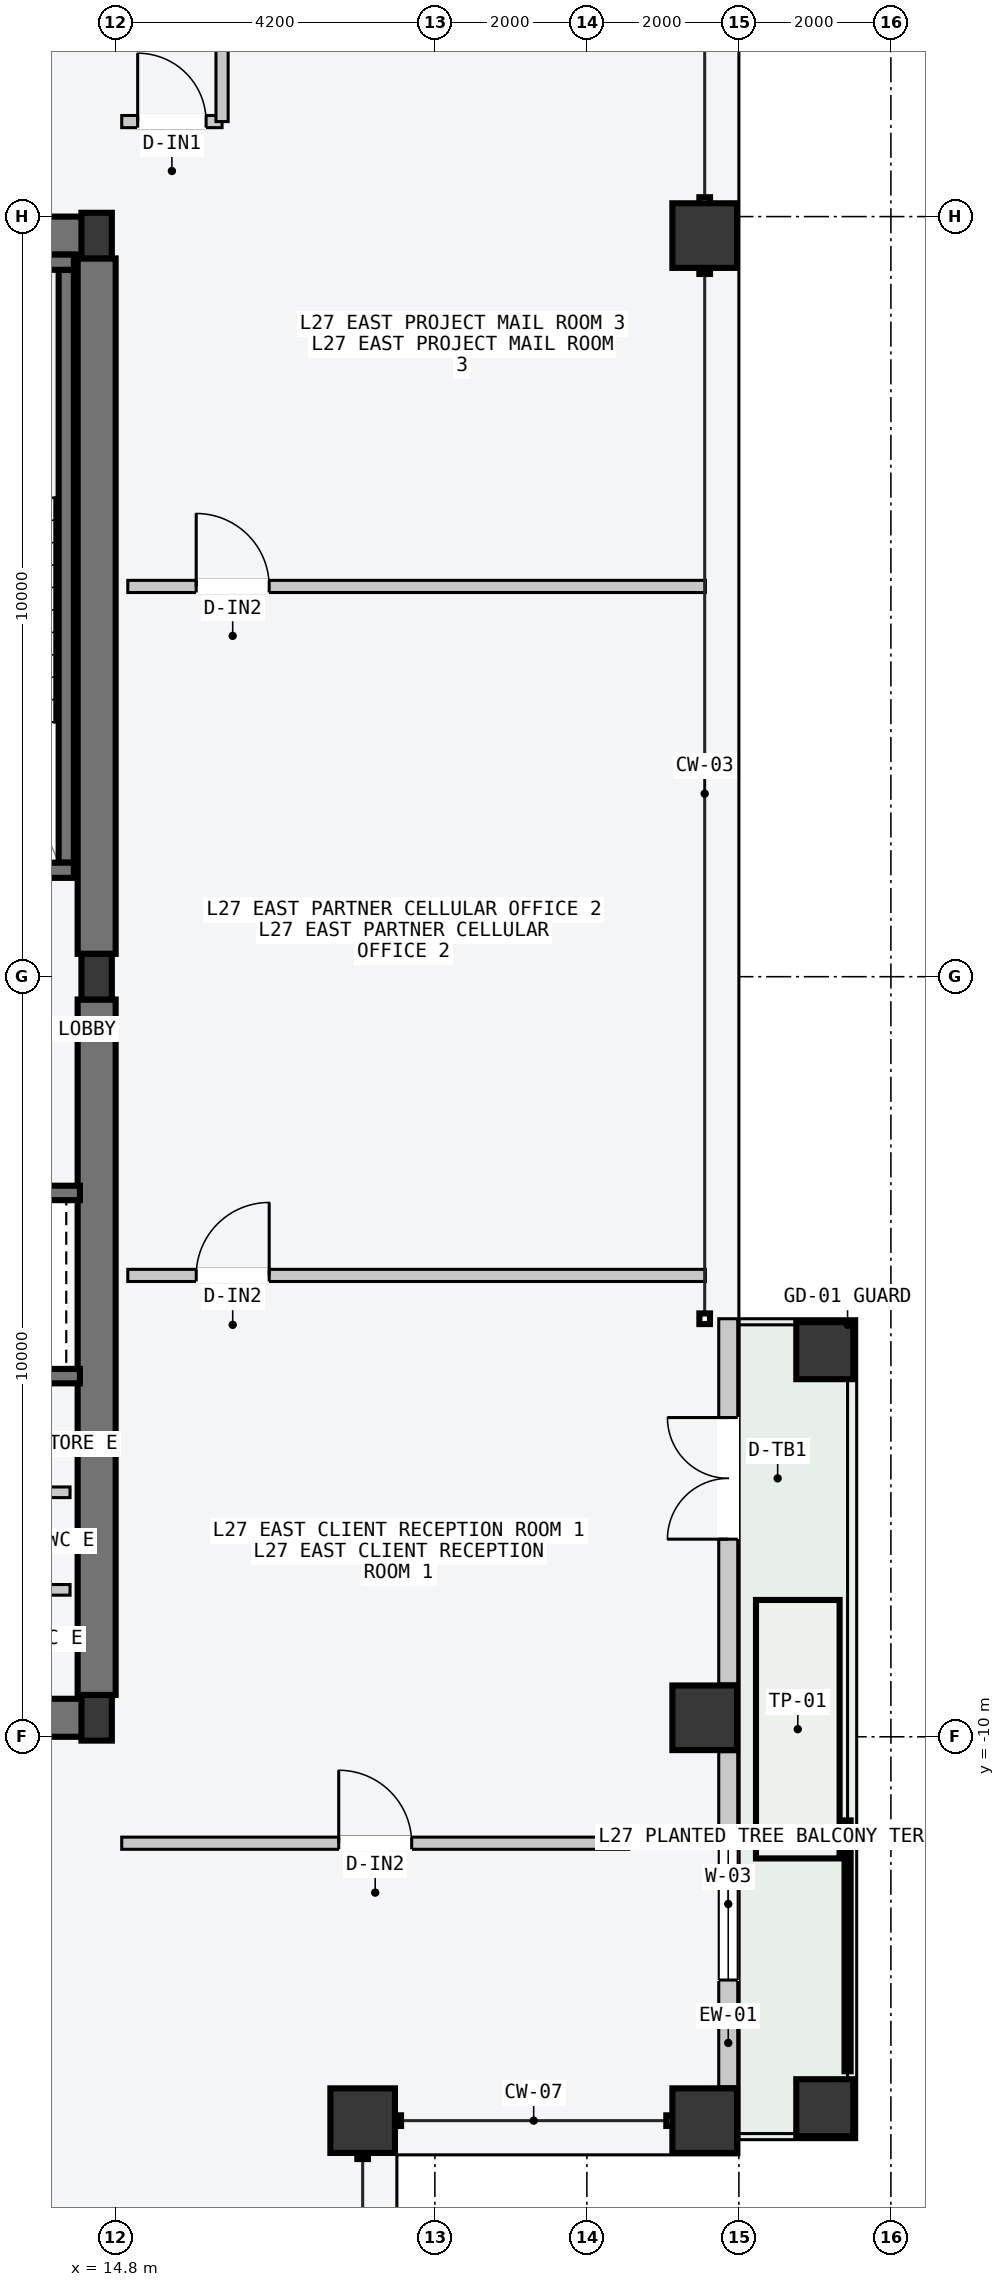
"""IFC4 building model, lengths in metres.
Left out: names, types, materials, properties, quantities, classifications, styles, units other than length and angle.
Written with IfcOpenShell. Run it as: python <this file> out.ifc"""

import sys

from ifc_helpers import new_model, si_unit, direction, frame, frame_2d, origin, origin_2d, place, context, subcontext, project, spatial, rectangle, hollow_rectangle, i_section, extrude, element, fill, save


model = new_model("IFC4")
c1 = context("Model", 3, precision=1e-05, world=origin(), true_north=direction((0.0, 1.0)))
c2 = subcontext(c1, "Body", "Model", "MODEL_VIEW")
j1 = project(units=[si_unit("LENGTHUNIT", "METRE"), si_unit("PLANEANGLEUNIT", "RADIAN")], contexts=[c1])
p1 = place(None, origin())
s1 = spatial("IfcSite", under=j1, at=p1, CompositionType="ELEMENT")
p2 = place(p1, origin())
s2 = spatial("IfcBuilding", under=s1, at=p2, CompositionType="ELEMENT")
p3 = place(p2, frame((0.0, 0.0, 106.2)))
s3 = spatial("IfcBuildingStorey", under=s2, at=p3, CompositionType="ELEMENT", Elevation=106.2)
for number, where, z_axis, x_axis in (
    (1, (8.07, -9.75, -0.2), (0.0, 0.0, 1.0), (1.0, 0.0, 0.0)),
    (2, (8.07, 9.75, -0.2), (0.0, 0.0, 1.0), (1.0, 0.0, 0.0)),
):
    element("IfcWall", number, at=place(p3, frame(where, z_axis=z_axis, x_axis=x_axis)), inside=s3, PredefinedType="SHEAR", context=c2, shape_type="SweptSolid", body=[
        extrude(rectangle(XDim=6.46, YDim=0.5, at=frame_2d((3.23, 0.0))), origin(), (0.0, 0.0, 1.0), 3.6),
    ])
for number, where, z_axis, x_axis in (
    (3, (14.55, -9.45, -0.2), (0.0, 0.0, 1.0), (0.0, 1.0, 0.0)),
    (4, (14.55, 0.3, -0.2), (0.0, 0.0, 1.0), (0.0, 1.0, 0.0)),
):
    element("IfcWall", number, at=place(p3, frame(where, z_axis=z_axis, x_axis=x_axis)), inside=s3, PredefinedType="SHEAR", context=c2, shape_type="SweptSolid", body=[
        extrude(rectangle(XDim=9.15, YDim=0.5, at=frame_2d((4.575, 0.0))), origin(), (0.0, 0.0, 1.0), 3.6),
    ])
p4 = place(p3, frame((14.15, 1.5, -0.2), z_axis=(0.0, 0.0, 1.0), x_axis=(0.0, 1.0, 0.0)))
e5 = element("IfcWall", 5, at=p4, inside=s3, PredefinedType="SOLIDWALL", context=c2, shape_type="SweptSolid", body=[
    extrude(rectangle(XDim=7.8, YDim=0.2, at=frame_2d((3.9, 0.0))), origin(), (0.0, 0.0, 1.0), 3.6),
])
p5 = place(p3, frame((10.15, 1.4, -0.2), z_axis=(0.0, 0.0, 1.0), x_axis=(1.0, 0.0, 0.0)))
e6 = element("IfcWall", 6, at=p5, inside=s3, PredefinedType="SOLIDWALL", context=c2, shape_type="SweptSolid", body=[
    extrude(rectangle(XDim=4.1, YDim=0.2, at=frame_2d((2.05, 0.0))), origin(), (0.0, 0.0, 1.0), 3.6),
])
p6 = place(p5, frame((1.5, 0.0, 0.2)))
e7 = element("IfcOpeningElement", 7, at=p6, cuts=e6, PredefinedType="OPENING", context=c2, shape_type="SweptSolid", body=[
    extrude(rectangle(XDim=1.12, YDim=2.18, at=frame_2d((0.56, 1.09))), frame((0.0, 0.11, 0.0), z_axis=(0.0, -1.0, 0.0), x_axis=(1.0, 0.0, 0.0)), (0.0, 0.0, 1.0), 0.22),
])
p7 = place(p3, frame((10.15, 9.4, -0.2), z_axis=(0.0, 0.0, 1.0), x_axis=(1.0, 0.0, 0.0)))
e8 = element("IfcWall", 8, at=p7, inside=s3, PredefinedType="SOLIDWALL", context=c2, shape_type="SweptSolid", body=[
    extrude(rectangle(XDim=4.1, YDim=0.2, at=frame_2d((2.05, 0.0))), origin(), (0.0, 0.0, 1.0), 3.6),
])
for number, where, z_axis, x_axis in (
    (9, (14.55, -9.75, 0.0), (0.0, 0.0, 1.0), (1.0, 0.0, 0.0)),
    (10, (14.55, 0.0, 0.0), (0.0, 0.0, 1.0), (1.0, 0.0, 0.0)),
    (11, (14.55, 9.75, 0.0), (0.0, 0.0, 1.0), (1.0, 0.0, 0.0)),
):
    element("IfcColumn", number, at=place(p3, frame(where, z_axis=z_axis, x_axis=x_axis)), inside=s3, PredefinedType="COLUMN", context=c2, shape_type="SweptSolid", body=[
        extrude(i_section(OverallWidth=0.4, OverallDepth=0.6, WebThickness=0.022, FlangeThickness=0.036, at=origin_2d()), origin(), (0.0, 0.0, 1.0), 3.6),
    ])
for number, where, z_axis, x_axis in (
    (12, (22.55, -15.05, 0.0), (0.0, 0.0, 1.0), (0.0, 1.0, 0.0)),
    (13, (22.55, -9.75, 0.0), (0.0, 0.0, 1.0), (0.0, 1.0, 0.0)),
    (14, (22.55, 9.75, 0.0), (0.0, 0.0, 1.0), (0.0, 1.0, 0.0)),
    (15, (18.05, -15.05, 0.0), (0.0, 0.0, 1.0), (1.0, 0.0, 0.0)),
):
    element("IfcColumn", number, at=place(p3, frame(where, z_axis=z_axis, x_axis=x_axis)), inside=s3, PredefinedType="COLUMN", context=c2, shape_type="SweptSolid", body=[
        extrude(hollow_rectangle(XDim=0.85, YDim=0.85, WallThickness=0.04, at=origin_2d()), origin(), (0.0, 0.0, 1.0), 3.6),
    ])
for number, where, z_axis, x_axis in (
    (16, (24.13, -14.88, 0.0), (0.0, 0.0, 1.0), (0.0, 1.0, 0.0)),
    (17, (24.13, -4.92, 0.0), (0.0, 0.0, 1.0), (0.0, 1.0, 0.0)),
):
    element("IfcColumn", number, at=place(p3, frame(where, z_axis=z_axis, x_axis=x_axis)), inside=s3, PredefinedType="COLUMN", context=c2, shape_type="SweptSolid", body=[
        extrude(hollow_rectangle(XDim=0.75, YDim=0.75, WallThickness=0.032, at=origin_2d()), origin(), (0.0, 0.0, 1.0), 3.6),
    ])
p8 = place(p3, frame((22.86, -14.605, 0.0), z_axis=(0.0, 0.0, 1.0), x_axis=(0.0, 1.0, 0.0)))
e18 = element("IfcWall", 18, at=p8, inside=s3, PredefinedType="STANDARD", context=c2, shape_type="SweptSolid", body=[
    extrude(rectangle(XDim=4.41, YDim=0.25, at=frame_2d((2.205, 0.0))), origin(), (0.0, 0.0, 1.0), 3.4),
])
p9 = place(p8, frame((1.405, 0.0, 0.85)))
e19 = element("IfcOpeningElement", 19, at=p9, cuts=e18, PredefinedType="OPENING", context=c2, shape_type="SweptSolid", body=[
    extrude(rectangle(XDim=2.0, YDim=2.1, at=frame_2d((1.0, 1.05))), frame((0.0, 0.135, 0.0), z_axis=(0.0, -1.0, 0.0), x_axis=(1.0, 0.0, 0.0)), (0.0, 0.0, 1.0), 0.27),
])
p10 = place(p3, frame((22.86, -9.305, 0.0), z_axis=(0.0, 0.0, 1.0), x_axis=(0.0, 1.0, 0.0)))
e20 = element("IfcWall", 20, at=p10, inside=s3, PredefinedType="STANDARD", context=c2, shape_type="SweptSolid", body=[
    extrude(rectangle(XDim=4.805, YDim=0.25, at=frame_2d((2.402, 0.0))), origin(), (0.0, 0.0, 1.0), 3.4),
])
p11 = place(p10, frame((1.905, 0.0, 0.0)))
e21 = element("IfcOpeningElement", 21, at=p11, cuts=e20, PredefinedType="OPENING", context=c2, shape_type="SweptSolid", body=[
    extrude(rectangle(XDim=1.6, YDim=2.2, at=frame_2d((0.8, 1.1))), frame((0.0, 0.135, 0.0), z_axis=(0.0, -1.0, 0.0), x_axis=(1.0, 0.0, 0.0)), (0.0, 0.0, 1.0), 0.27),
])
p12 = place(p3, frame((11.65, -2.845, -0.2), z_axis=(0.0, 0.0, 1.0), x_axis=(1.0, 0.0, 0.0)))
e22 = element("IfcWall", 22, at=p12, inside=s3, PredefinedType="SOLIDWALL", context=c2, shape_type="SweptSolid", body=[
    extrude(rectangle(XDim=2.68, YDim=0.19, at=frame_2d((1.34, 0.0))), origin(), (0.0, 0.0, 1.0), 3.6),
])
p13 = place(p12, frame((0.65, 0.0, 0.2)))
e23 = element("IfcOpeningElement", 23, at=p13, cuts=e22, PredefinedType="OPENING", context=c2, shape_type="SweptSolid", body=[
    extrude(rectangle(XDim=1.2, YDim=2.2, at=frame_2d((0.6, 1.1))), frame((0.0, 0.105, 0.0), z_axis=(0.0, -1.0, 0.0), x_axis=(1.0, 0.0, 0.0)), (0.0, 0.0, 1.0), 0.21),
])
p14 = place(p3, frame((11.65, -5.255, -0.2), z_axis=(0.0, 0.0, 1.0), x_axis=(1.0, 0.0, 0.0)))
e24 = element("IfcWall", 24, at=p14, inside=s3, PredefinedType="SOLIDWALL", context=c2, shape_type="SweptSolid", body=[
    extrude(rectangle(XDim=2.68, YDim=0.19, at=frame_2d((1.34, 0.0))), origin(), (0.0, 0.0, 1.0), 3.6),
])
for number, where, z_axis, x_axis in (
    (25, (11.7, -8.067, 0.0), (0.0, 0.0, 1.0), (1.0, 0.0, 0.0)),
    (26, (11.7, -6.783, 0.0), (0.0, 0.0, 1.0), (1.0, 0.0, 0.0)),
):
    element("IfcWall", number, at=place(p3, frame(where, z_axis=z_axis, x_axis=x_axis)), inside=s3, PredefinedType="PARTITIONING", context=c2, shape_type="SweptSolid", body=[
        extrude(rectangle(XDim=2.5, YDim=0.14, at=frame_2d((1.25, 0.0))), origin(), (0.0, 0.0, 1.0), 3.4),
    ])
p15 = place(p3, frame((14.88, -11.4, 0.0), z_axis=(0.0, 0.0, 1.0), x_axis=(1.0, 0.0, 0.0)))
e27 = element("IfcWall", 27, at=p15, inside=s3, PredefinedType="PARTITIONING", context=c2, shape_type="SweptSolid", body=[
    extrude(rectangle(XDim=6.67, YDim=0.16, at=frame_2d((3.335, 0.0))), origin(), (0.0, 0.0, 1.0), 3.4),
])
p16 = place(p15, frame((2.855, 0.0, 0.0)))
e28 = element("IfcOpeningElement", 28, at=p16, cuts=e27, PredefinedType="OPENING", context=c2, shape_type="SweptSolid", body=[
    extrude(rectangle(XDim=0.96, YDim=2.18, at=frame_2d((0.48, 1.09))), frame((0.0, 0.09, 0.0), z_axis=(0.0, -1.0, 0.0), x_axis=(1.0, 0.0, 0.0)), (0.0, 0.0, 1.0), 0.18),
])
p17 = place(p3, frame((14.88, 11.25, 0.0), z_axis=(0.0, 0.0, 1.0), x_axis=(1.0, 0.0, 0.0)))
e29 = element("IfcWall", 29, at=p17, inside=s3, PredefinedType="PARTITIONING", context=c2, shape_type="SweptSolid", body=[
    extrude(rectangle(XDim=1.32, YDim=0.16, at=frame_2d((0.66, 0.0))), origin(), (0.0, 0.0, 1.0), 3.4),
])
p18 = place(p17, frame((0.21, 0.0, 0.0)))
e30 = element("IfcOpeningElement", 30, at=p18, cuts=e29, PredefinedType="OPENING", context=c2, shape_type="SweptSolid", body=[
    extrude(rectangle(XDim=0.9, YDim=2.15, at=frame_2d((0.45, 1.075))), frame((0.0, 0.09, 0.0), z_axis=(0.0, -1.0, 0.0), x_axis=(1.0, 0.0, 0.0)), (0.0, 0.0, 1.0), 0.18),
])
p19 = place(p3, frame((16.2, 11.25, 0.0), z_axis=(0.0, 0.0, 1.0), x_axis=(0.0, 1.0, 0.0)))
e31 = element("IfcWall", 31, at=p19, inside=s3, PredefinedType="PARTITIONING", context=c2, shape_type="SweptSolid", body=[
    extrude(rectangle(XDim=1.95, YDim=0.16, at=frame_2d((0.975, 0.0))), origin(), (0.0, 0.0, 1.0), 3.4),
])
p20 = place(p3, frame((14.96, -3.93, 0.0), z_axis=(0.0, 0.0, 1.0), x_axis=(1.0, 0.0, 0.0)))
e32 = element("IfcWall", 32, at=p20, inside=s3, PredefinedType="PARTITIONING", context=c2, shape_type="SweptSolid", body=[
    extrude(rectangle(XDim=7.6, YDim=0.16, at=frame_2d((3.8, 0.0))), origin(), (0.0, 0.0, 1.0), 3.4),
])
p21 = place(p20, frame((0.9, 0.0, 0.0)))
e33 = element("IfcOpeningElement", 33, at=p21, cuts=e32, PredefinedType="OPENING", context=c2, shape_type="SweptSolid", body=[
    extrude(rectangle(XDim=0.96, YDim=2.18, at=frame_2d((0.48, 1.09))), frame((0.0, 0.09, 0.0), z_axis=(0.0, -1.0, 0.0), x_axis=(1.0, 0.0, 0.0)), (0.0, 0.0, 1.0), 0.18),
])
p22 = place(p3, frame((14.96, 5.134, 0.0), z_axis=(0.0, 0.0, 1.0), x_axis=(1.0, 0.0, 0.0)))
e34 = element("IfcWall", 34, at=p22, inside=s3, PredefinedType="PARTITIONING", context=c2, shape_type="SweptSolid", body=[
    extrude(rectangle(XDim=7.6, YDim=0.16, at=frame_2d((3.8, 0.0))), origin(), (0.0, 0.0, 1.0), 3.4),
])
p23 = place(p22, frame((0.9, 0.0, 0.0)))
e35 = element("IfcOpeningElement", 35, at=p23, cuts=e34, PredefinedType="OPENING", context=c2, shape_type="SweptSolid", body=[
    extrude(rectangle(XDim=0.96, YDim=2.18, at=frame_2d((0.48, 1.09))), frame((0.0, 0.09, 0.0), z_axis=(0.0, -1.0, 0.0), x_axis=(1.0, 0.0, 0.0)), (0.0, 0.0, 1.0), 0.18),
])
p24 = place(p9, origin())
e36 = element("IfcWindow", 36, at=p24, inside=s3, PartitioningType="SINGLE_PANEL", PredefinedType="WINDOW", context=c2, shape_type="SweptSolid", body=[
    extrude(rectangle(XDim=2.0, YDim=2.1, at=frame_2d((1.0, 1.05))), frame((0.0, 0.03, 0.0), z_axis=(0.0, -1.0, 0.0), x_axis=(1.0, 0.0, 0.0)), (0.0, 0.0, 1.0), 0.06),
])
fill(e19, e36)
p25 = place(p11, origin())
e37 = element("IfcDoor", 37, at=p25, inside=s3, OperationType="DOUBLE_DOOR_SINGLE_SWING", PredefinedType="DOOR", context=c2, shape_type="SweptSolid", body=[
    extrude(rectangle(XDim=1.6, YDim=2.2, at=frame_2d((0.8, 1.1))), frame((0.0, 0.025, 0.0), z_axis=(0.0, -1.0, 0.0), x_axis=(1.0, 0.0, 0.0)), (0.0, 0.0, 1.0), 0.05),
])
fill(e21, e37)
p26 = place(p16, origin())
e38 = element("IfcDoor", 38, at=p26, inside=s3, OperationType="SINGLE_SWING_LEFT", PredefinedType="DOOR", context=c2, shape_type="SweptSolid", body=[
    extrude(rectangle(XDim=0.96, YDim=2.18, at=frame_2d((0.48, 1.09))), frame((0.0, 0.025, 0.0), z_axis=(0.0, -1.0, 0.0), x_axis=(1.0, 0.0, 0.0)), (0.0, 0.0, 1.0), 0.05),
])
fill(e28, e38)
p27 = place(p18, origin())
e39 = element("IfcDoor", 39, at=p27, inside=s3, OperationType="SINGLE_SWING_LEFT", PredefinedType="DOOR", context=c2, shape_type="SweptSolid", body=[
    extrude(rectangle(XDim=0.9, YDim=2.15, at=frame_2d((0.45, 1.075))), frame((0.0, 0.025, 0.0), z_axis=(0.0, -1.0, 0.0), x_axis=(1.0, 0.0, 0.0)), (0.0, 0.0, 1.0), 0.05),
])
fill(e30, e39)
p28 = place(p21, origin())
e40 = element("IfcDoor", 40, at=p28, inside=s3, OperationType="SINGLE_SWING_RIGHT", PredefinedType="DOOR", context=c2, shape_type="SweptSolid", body=[
    extrude(rectangle(XDim=0.96, YDim=2.18, at=frame_2d((0.48, 1.09))), frame((0.0, 0.025, 0.0), z_axis=(0.0, -1.0, 0.0), x_axis=(1.0, 0.0, 0.0)), (0.0, 0.0, 1.0), 0.05),
])
fill(e33, e40)
p29 = place(p23, origin())
e41 = element("IfcDoor", 41, at=p29, inside=s3, OperationType="SINGLE_SWING_LEFT", PredefinedType="DOOR", context=c2, shape_type="SweptSolid", body=[
    extrude(rectangle(XDim=0.96, YDim=2.18, at=frame_2d((0.48, 1.09))), frame((0.0, 0.025, 0.0), z_axis=(0.0, -1.0, 0.0), x_axis=(1.0, 0.0, 0.0)), (0.0, 0.0, 1.0), 0.05),
])
fill(e35, e41)
save(model, sys.argv[1])
